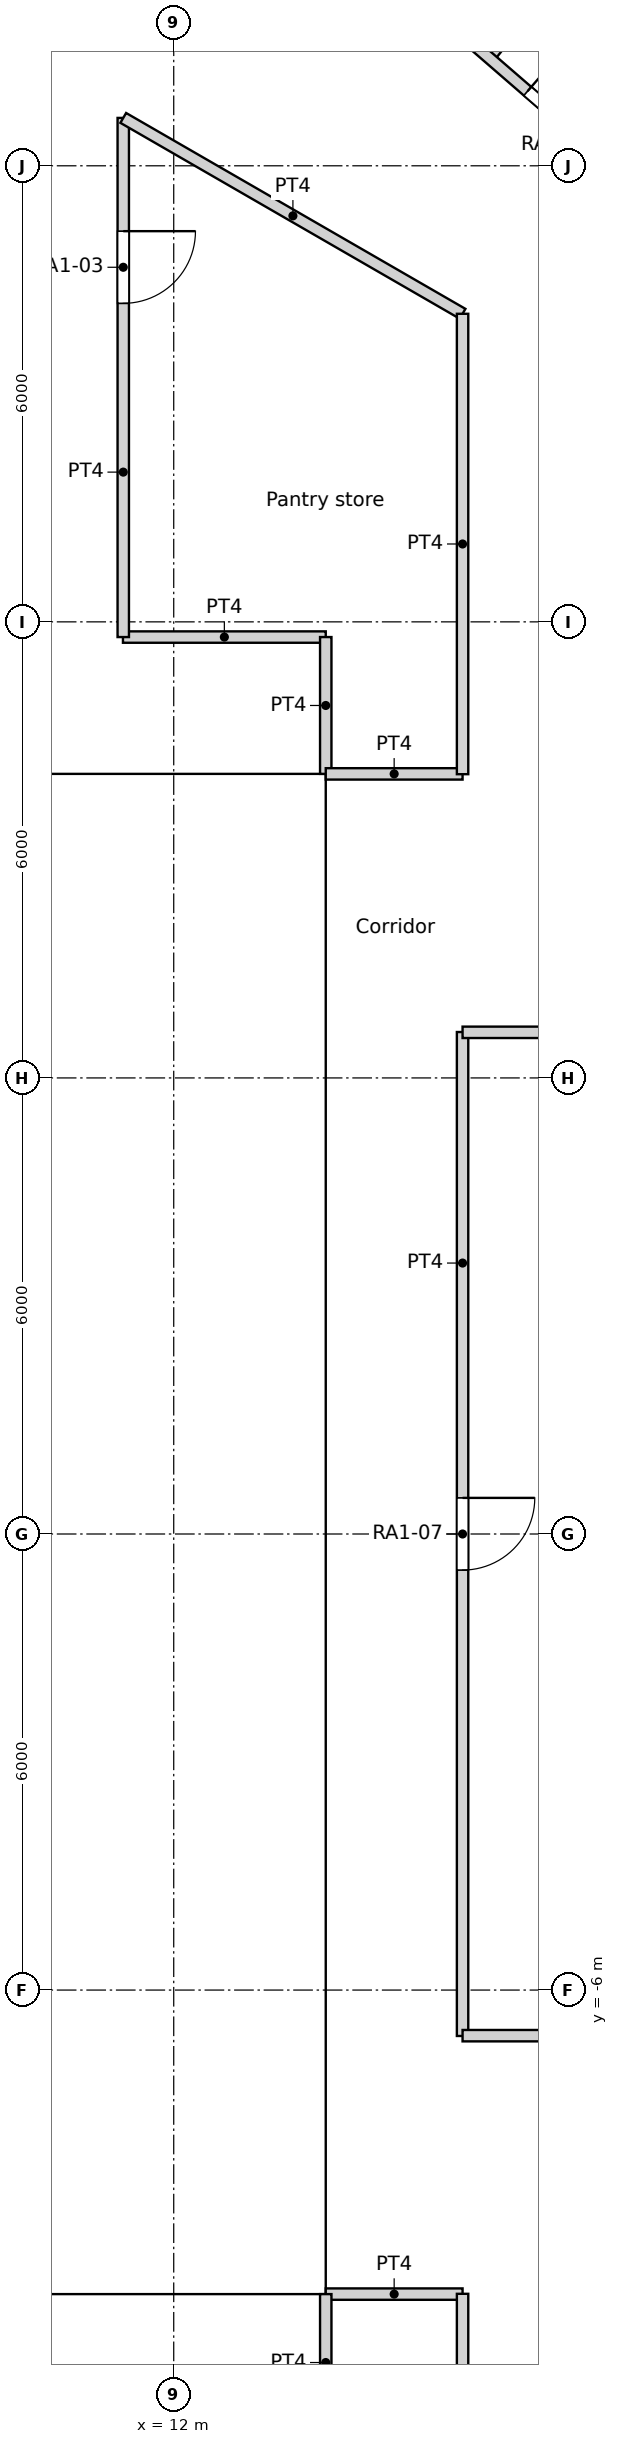
"""IFC4 building model, lengths in metres.
Left out: names, types, materials, properties, quantities, classifications, styles, units other than length and angle.
Written with IfcOpenShell. Run it as: python <this file> out.ifc"""

import sys

from ifc_helpers import new_model, si_unit, direction, frame, frame_2d, origin, origin_2d, place, context, subcontext, project, spatial, rectangle, circle, extrude, element, fill, save


model = new_model("IFC4")
c1 = context("Model", 3, precision=1e-05, world=origin(), true_north=direction((0.0, 1.0)))
c2 = subcontext(c1, "Body", "Model", "MODEL_VIEW")
j1 = project(units=[si_unit("LENGTHUNIT", "METRE"), si_unit("PLANEANGLEUNIT", "RADIAN")], contexts=[c1])
p1 = place(None, origin())
s1 = spatial("IfcSite", under=j1, at=p1, CompositionType="ELEMENT")
p2 = place(p1, origin())
s2 = spatial("IfcBuilding", under=s1, at=p2, CompositionType="ELEMENT")
p3 = place(p2, frame((0.0, 0.0, 28.2)))
s3 = spatial("IfcBuildingStorey", under=s2, at=p3, CompositionType="ELEMENT", Elevation=28.2)
p4 = place(p3, frame((14.659, 19.69, 0.0), z_axis=(0.0, 0.0, 1.0), x_axis=(1.0, 0.0, 0.0)))
e1 = element("IfcColumn", 1, at=p4, inside=s3, PredefinedType="COLUMN", context=c2, shape_type="SweptSolid", body=[
    extrude(circle(Radius=0.75, at=origin_2d()), origin(), (0.0, 0.0, 1.0), 3.6),
])
for number, where, z_axis, x_axis in (
    (2, (15.552, 10.603, 0.0), (0.0, 0.0, 1.0), (1.0, 0.0, 0.0)),
    (3, (11.735, 14.716, 0.0), (0.0, 0.0, 1.0), (1.0, 0.0, 0.0)),
    (4, (15.552, -10.603, 0.0), (0.0, 0.0, 1.0), (1.0, 0.0, 0.0)),
):
    element("IfcColumn", number, at=place(p3, frame(where, z_axis=z_axis, x_axis=x_axis)), inside=s3, PredefinedType="COLUMN", context=c2, shape_type="SweptSolid", body=[
        extrude(circle(Radius=0.8, at=origin_2d()), origin(), (0.0, 0.0, 1.0), 3.6),
    ])
p5 = place(p3, frame((-14.0, -9.4, 0.0), z_axis=(0.0, 0.0, 1.0), x_axis=(1.0, 0.0, 0.0)))
e5 = element("IfcWall", 5, at=p5, inside=s3, PredefinedType="SOLIDWALL", context=c2, shape_type="SweptSolid", body=[
    extrude(rectangle(XDim=28.0, YDim=1.2, at=frame_2d((14.0, 0.0))), origin(), (0.0, 0.0, 1.0), 3.6),
])
p6 = place(p5, frame((14.9, 0.0, 0.0)))
e6 = element("IfcOpeningElement", 6, at=p6, cuts=e5, PredefinedType="OPENING", context=c2, shape_type="SweptSolid", body=[
    extrude(rectangle(XDim=1.0, YDim=2.1, at=frame_2d((0.5, 1.05))), frame((0.0, 0.6, 0.0), z_axis=(0.0, -1.0, 0.0), x_axis=(1.0, 0.0, 0.0)), (0.0, 0.0, 1.0), 1.2),
])
p7 = place(p5, frame((9.8, 0.0, 0.0)))
e7 = element("IfcOpeningElement", 7, at=p7, cuts=e5, PredefinedType="OPENING", context=c2, shape_type="SweptSolid", body=[
    extrude(rectangle(XDim=1.8, YDim=2.1, at=frame_2d((0.9, 1.05))), frame((0.0, 0.6, 0.0), z_axis=(0.0, -1.0, 0.0), x_axis=(1.0, 0.0, 0.0)), (0.0, 0.0, 1.0), 1.2),
])
p8 = place(p5, frame((16.4, 0.0, 0.0)))
e8 = element("IfcOpeningElement", 8, at=p8, cuts=e5, PredefinedType="OPENING", context=c2, shape_type="SweptSolid", body=[
    extrude(rectangle(XDim=1.8, YDim=2.1, at=frame_2d((0.9, 1.05))), frame((0.0, 0.6, 0.0), z_axis=(0.0, -1.0, 0.0), x_axis=(1.0, 0.0, 0.0)), (0.0, 0.0, 1.0), 1.2),
])
p9 = place(p3, frame((-14.0, 9.4, 0.0), z_axis=(0.0, 0.0, 1.0), x_axis=(1.0, 0.0, 0.0)))
e9 = element("IfcWall", 9, at=p9, inside=s3, PredefinedType="SOLIDWALL", context=c2, shape_type="SweptSolid", body=[
    extrude(rectangle(XDim=28.0, YDim=1.2, at=frame_2d((14.0, 0.0))), origin(), (0.0, 0.0, 1.0), 3.6),
])
p10 = place(p9, frame((9.8, 0.0, 0.0)))
e10 = element("IfcOpeningElement", 10, at=p10, cuts=e9, PredefinedType="OPENING", context=c2, shape_type="SweptSolid", body=[
    extrude(rectangle(XDim=1.8, YDim=2.1, at=frame_2d((0.9, 1.05))), frame((0.0, 0.6, 0.0), z_axis=(0.0, -1.0, 0.0), x_axis=(1.0, 0.0, 0.0)), (0.0, 0.0, 1.0), 1.2),
])
p11 = place(p3, frame((13.4, -8.8, 0.0), z_axis=(0.0, 0.0, 1.0), x_axis=(0.0, 1.0, 0.0)))
e11 = element("IfcWall", 11, at=p11, inside=s3, PredefinedType="SOLIDWALL", context=c2, shape_type="SweptSolid", body=[
    extrude(rectangle(XDim=17.6, YDim=1.2, at=frame_2d((8.8, 0.0))), origin(), (0.0, 0.0, 1.0), 3.6),
])
p12 = place(p11, frame((6.3, 0.0, 0.0)))
e12 = element("IfcOpeningElement", 12, at=p12, cuts=e11, PredefinedType="OPENING", context=c2, shape_type="SweptSolid", body=[
    extrude(rectangle(XDim=1.0, YDim=2.1, at=frame_2d((0.5, 1.05))), frame((0.0, 0.6, 0.0), z_axis=(0.0, -1.0, 0.0), x_axis=(1.0, 0.0, 0.0)), (0.0, 0.0, 1.0), 1.2),
])
for number, where, z_axis, x_axis in (
    (13, (12.2, -8.8, 0.0), (0.0, 0.0, 1.0), (0.0, 1.0, 0.0)),
    (14, (12.2, 4.7, 0.0), (0.0, 0.0, 1.0), (0.0, 1.0, 0.0)),
):
    element("IfcWall", number, at=place(p3, frame(where, z_axis=z_axis, x_axis=x_axis)), inside=s3, PredefinedType="SOLIDWALL", context=c2, shape_type="SweptSolid", body=[
        extrude(rectangle(XDim=4.1, YDim=1.2, at=frame_2d((2.05, 0.0))), origin(), (0.0, 0.0, 1.0), 3.15),
    ])
for number, where, z_axis, x_axis in (
    (15, (9.2, -4.55, 0.0), (0.0, 0.0, 1.0), (1.0, 0.0, 0.0)),
    (16, (9.2, 4.55, 0.0), (0.0, 0.0, 1.0), (1.0, 0.0, 0.0)),
):
    element("IfcWall", number, at=place(p3, frame(where, z_axis=z_axis, x_axis=x_axis)), inside=s3, PredefinedType="SOLIDWALL", context=c2, shape_type="SweptSolid", body=[
        extrude(rectangle(XDim=3.6, YDim=0.3, at=frame_2d((1.8, 0.0))), origin(), (0.0, 0.0, 1.0), 3.15),
    ])
for number, where, z_axis, x_axis in (
    (17, (9.2, -8.2, 0.0), (0.0, 0.0, 1.0), (1.0, 0.0, 0.0)),
    (18, (9.2, 8.2, 0.0), (0.0, 0.0, 1.0), (1.0, 0.0, 0.0)),
):
    element("IfcWall", number, at=place(p3, frame(where, z_axis=z_axis, x_axis=x_axis)), inside=s3, PredefinedType="SOLIDWALL", context=c2, shape_type="SweptSolid", body=[
        extrude(rectangle(XDim=2.4, YDim=1.2, at=frame_2d((1.2, 0.0))), origin(), (0.0, 0.0, 1.0), 3.15),
    ])
p13 = place(p3, frame((11.332, 11.8, 0.0), z_axis=(0.0, 0.0, 1.0), x_axis=(1.0, 0.0, 0.0)))
e19 = element("IfcWall", 19, at=p13, inside=s3, PredefinedType="PARTITIONING", context=c2, shape_type="SweptSolid", body=[
    extrude(rectangle(XDim=2.668, YDim=0.15, at=frame_2d((1.334, 0.0))), origin(), (0.0, 0.0, 1.0), 3.15),
])
for number, where, z_axis, x_axis in (
    (20, (14.0, 10.0, 0.0), (0.0, 0.0, 1.0), (0.0, 1.0, 0.0)),
    (21, (14.0, -11.8, 0.0), (0.0, 0.0, 1.0), (0.0, 1.0, 0.0)),
    (22, (14.0, 10.0, 0.0), (0.0, 0.0, 1.0), (1.0, 0.0, 0.0)),
    (23, (14.0, -10.0, 0.0), (0.0, 0.0, 1.0), (1.0, 0.0, 0.0)),
):
    element("IfcWall", number, at=place(p3, frame(where, z_axis=z_axis, x_axis=x_axis)), inside=s3, PredefinedType="PARTITIONING", context=c2, shape_type="SweptSolid", body=[
        extrude(rectangle(XDim=1.8, YDim=0.15, at=frame_2d((0.9, 0.0))), origin(), (0.0, 0.0, 1.0), 3.15),
    ])
p14 = place(p3, frame((15.8, -6.604, 0.0), z_axis=(0.0, 0.0, 1.0), x_axis=(0.0, 1.0, 0.0)))
e24 = element("IfcWall", 24, at=p14, inside=s3, PredefinedType="PARTITIONING", context=c2, shape_type="SweptSolid", body=[
    extrude(rectangle(XDim=13.208, YDim=0.15, at=frame_2d((6.604, 0.0))), origin(), (0.0, 0.0, 1.0), 3.15),
])
p15 = place(p14, frame((6.129, 0.0, 0.0)))
e25 = element("IfcOpeningElement", 25, at=p15, cuts=e24, PredefinedType="OPENING", context=c2, shape_type="SweptSolid", body=[
    extrude(rectangle(XDim=0.95, YDim=2.1, at=frame_2d((0.475, 1.05))), frame((0.0, 0.075, 0.0), z_axis=(0.0, -1.0, 0.0), x_axis=(1.0, 0.0, 0.0)), (0.0, 0.0, 1.0), 0.15),
])
for number, where, z_axis, x_axis in (
    (26, (15.8, 9.996, 0.0), (0.0, 0.0, 1.0), (0.0, 1.0, 0.0)),
    (27, (15.8, -16.053, 0.0), (0.0, 0.0, 1.0), (0.0, 1.0, 0.0)),
):
    element("IfcWall", number, at=place(p3, frame(where, z_axis=z_axis, x_axis=x_axis)), inside=s3, PredefinedType="PARTITIONING", context=c2, shape_type="SweptSolid", body=[
        extrude(rectangle(XDim=6.057, YDim=0.15, at=frame_2d((3.028, 0.0))), origin(), (0.0, 0.0, 1.0), 3.15),
    ])
for number, where, z_axis, x_axis in (
    (28, (15.8, -6.6, 0.0), (0.0, 0.0, 1.0), (1.0, 0.0, 0.0)),
    (29, (15.8, 6.6, 0.0), (0.0, 0.0, 1.0), (1.0, 0.0, 0.0)),
):
    element("IfcWall", number, at=place(p3, frame(where, z_axis=z_axis, x_axis=x_axis)), inside=s3, PredefinedType="PARTITIONING", context=c2, shape_type="SweptSolid", body=[
        extrude(rectangle(XDim=5.564, YDim=0.15, at=frame_2d((2.782, 0.0))), origin(), (0.0, 0.0, 1.0), 3.15),
    ])
p16 = place(p3, frame((10.932, 23.939, 0.0), z_axis=(0.0, 0.0, 1.0), x_axis=(0.755838982892, -0.654757536757, 0.0)))
e30 = element("IfcWall", 30, at=p16, inside=s3, PredefinedType="PARTITIONING", context=c2, shape_type="SweptSolid", body=[
    extrude(rectangle(XDim=14.83, YDim=0.15, at=frame_2d((7.415, 0.0))), origin(), (0.0, 0.0, 1.0), 3.15),
])
p17 = place(p16, frame((12.796, 0.0, 0.0)))
e31 = element("IfcOpeningElement", 31, at=p17, cuts=e30, PredefinedType="OPENING", context=c2, shape_type="SweptSolid", body=[
    extrude(rectangle(XDim=1.0, YDim=2.1, at=frame_2d((0.5, 1.05))), frame((0.0, 0.075, 0.0), z_axis=(0.0, -1.0, 0.0), x_axis=(1.0, 0.0, 0.0)), (0.0, 0.0, 1.0), 0.15),
])
p18 = place(p16, frame((7.572, 0.0, 0.0)))
e32 = element("IfcOpeningElement", 32, at=p18, cuts=e30, PredefinedType="OPENING", context=c2, shape_type="SweptSolid", body=[
    extrude(rectangle(XDim=1.0, YDim=2.1, at=frame_2d((0.5, 1.05))), frame((0.0, 0.075, 0.0), z_axis=(0.0, -1.0, 0.0), x_axis=(1.0, 0.0, 0.0)), (0.0, 0.0, 1.0), 0.15),
])
p19 = place(p16, frame((1.033, 0.0, 0.0)))
e33 = element("IfcOpeningElement", 33, at=p19, cuts=e30, PredefinedType="OPENING", context=c2, shape_type="SweptSolid", body=[
    extrude(rectangle(XDim=1.0, YDim=2.1, at=frame_2d((0.5, 1.05))), frame((0.0, 0.075, 0.0), z_axis=(0.0, -1.0, 0.0), x_axis=(1.0, 0.0, 0.0)), (0.0, 0.0, 1.0), 0.15),
])
p20 = place(p3, frame((11.336, 18.63, 0.0), z_axis=(0.0, 0.0, 1.0), x_axis=(0.866063337164, -0.499934291702, 0.0)))
e34 = element("IfcWall", 34, at=p20, inside=s3, PredefinedType="PARTITIONING", context=c2, shape_type="SweptSolid", body=[
    extrude(rectangle(XDim=5.155, YDim=0.15, at=frame_2d((2.577, 0.0))), origin(), (0.0, 0.0, 1.0), 3.15),
])
p21 = place(p3, frame((11.336, 11.8, 0.0), z_axis=(0.0, 0.0, 1.0), x_axis=(0.0, 1.0, 0.0)))
e35 = element("IfcWall", 35, at=p21, inside=s3, PredefinedType="PARTITIONING", context=c2, shape_type="SweptSolid", body=[
    extrude(rectangle(XDim=6.83, YDim=0.15, at=frame_2d((3.415, 0.0))), origin(), (0.0, 0.0, 1.0), 3.15),
])
p22 = place(p21, frame((4.39, 0.0, 0.0)))
e36 = element("IfcOpeningElement", 36, at=p22, cuts=e35, PredefinedType="OPENING", context=c2, shape_type="SweptSolid", body=[
    extrude(rectangle(XDim=0.95, YDim=2.1, at=frame_2d((0.475, 1.05))), frame((0.0, 0.075, 0.0), z_axis=(0.0, -1.0, 0.0), x_axis=(1.0, 0.0, 0.0)), (0.0, 0.0, 1.0), 0.15),
])
p23 = place(p3, frame((16.168, 19.404, 0.0), z_axis=(0.0, 0.0, 1.0), x_axis=(0.618142414415, 0.786066126672, 0.0)))
e37 = element("IfcWall", 37, at=p23, inside=s3, PredefinedType="PARTITIONING", context=c2, shape_type="SweptSolid", body=[
    extrude(rectangle(XDim=2.453, YDim=0.1, at=frame_2d((1.226, 0.0))), origin(), (0.0, 0.0, 1.0), 3.15),
])
p24 = place(p23, frame((0.776, 0.0, 0.0)))
e38 = element("IfcOpeningElement", 38, at=p24, cuts=e37, PredefinedType="OPENING", context=c2, shape_type="SweptSolid", body=[
    extrude(rectangle(XDim=0.9, YDim=2.04, at=frame_2d((0.45, 1.02))), frame((0.0, 0.05, 0.0), z_axis=(0.0, -1.0, 0.0), x_axis=(1.0, 0.0, 0.0)), (0.0, 0.0, 1.0), 0.1),
])
p25 = place(p12, origin())
e39 = element("IfcDoor", 39, at=p25, inside=s3, OperationType="DOUBLE_DOOR_SINGLE_SWING", PredefinedType="DOOR", context=c2, shape_type="SweptSolid", body=[
    extrude(rectangle(XDim=1.0, YDim=2.1, at=frame_2d((0.5, 1.05))), frame((0.0, 0.025, 0.0), z_axis=(0.0, -1.0, 0.0), x_axis=(1.0, 0.0, 0.0)), (0.0, 0.0, 1.0), 0.05),
])
fill(e12, e39)
p26 = place(p22, origin())
e40 = element("IfcDoor", 40, at=p26, inside=s3, OperationType="SINGLE_SWING_LEFT", PredefinedType="DOOR", context=c2, shape_type="SweptSolid", body=[
    extrude(rectangle(XDim=0.95, YDim=2.1, at=frame_2d((0.475, 1.05))), frame((0.0, 0.025, 0.0), z_axis=(0.0, -1.0, 0.0), x_axis=(1.0, 0.0, 0.0)), (0.0, 0.0, 1.0), 0.05),
])
fill(e36, e40)
p27 = place(p15, origin())
e41 = element("IfcDoor", 41, at=p27, inside=s3, OperationType="SINGLE_SWING_LEFT", PredefinedType="DOOR", context=c2, shape_type="SweptSolid", body=[
    extrude(rectangle(XDim=0.95, YDim=2.1, at=frame_2d((0.475, 1.05))), frame((0.0, 0.025, 0.0), z_axis=(0.0, -1.0, 0.0), x_axis=(1.0, 0.0, 0.0)), (0.0, 0.0, 1.0), 0.05),
])
fill(e25, e41)
p28 = place(p18, origin())
e42 = element("IfcDoor", 42, at=p28, inside=s3, OperationType="SINGLE_SWING_LEFT", PredefinedType="DOOR", context=c2, shape_type="SweptSolid", body=[
    extrude(rectangle(XDim=1.0, YDim=2.1, at=frame_2d((0.5, 1.05))), frame((0.0, 0.025, 0.0), z_axis=(0.0, -1.0, 0.0), x_axis=(1.0, 0.0, 0.0)), (0.0, 0.0, 1.0), 0.05),
])
fill(e32, e42)
save(model, sys.argv[1])
